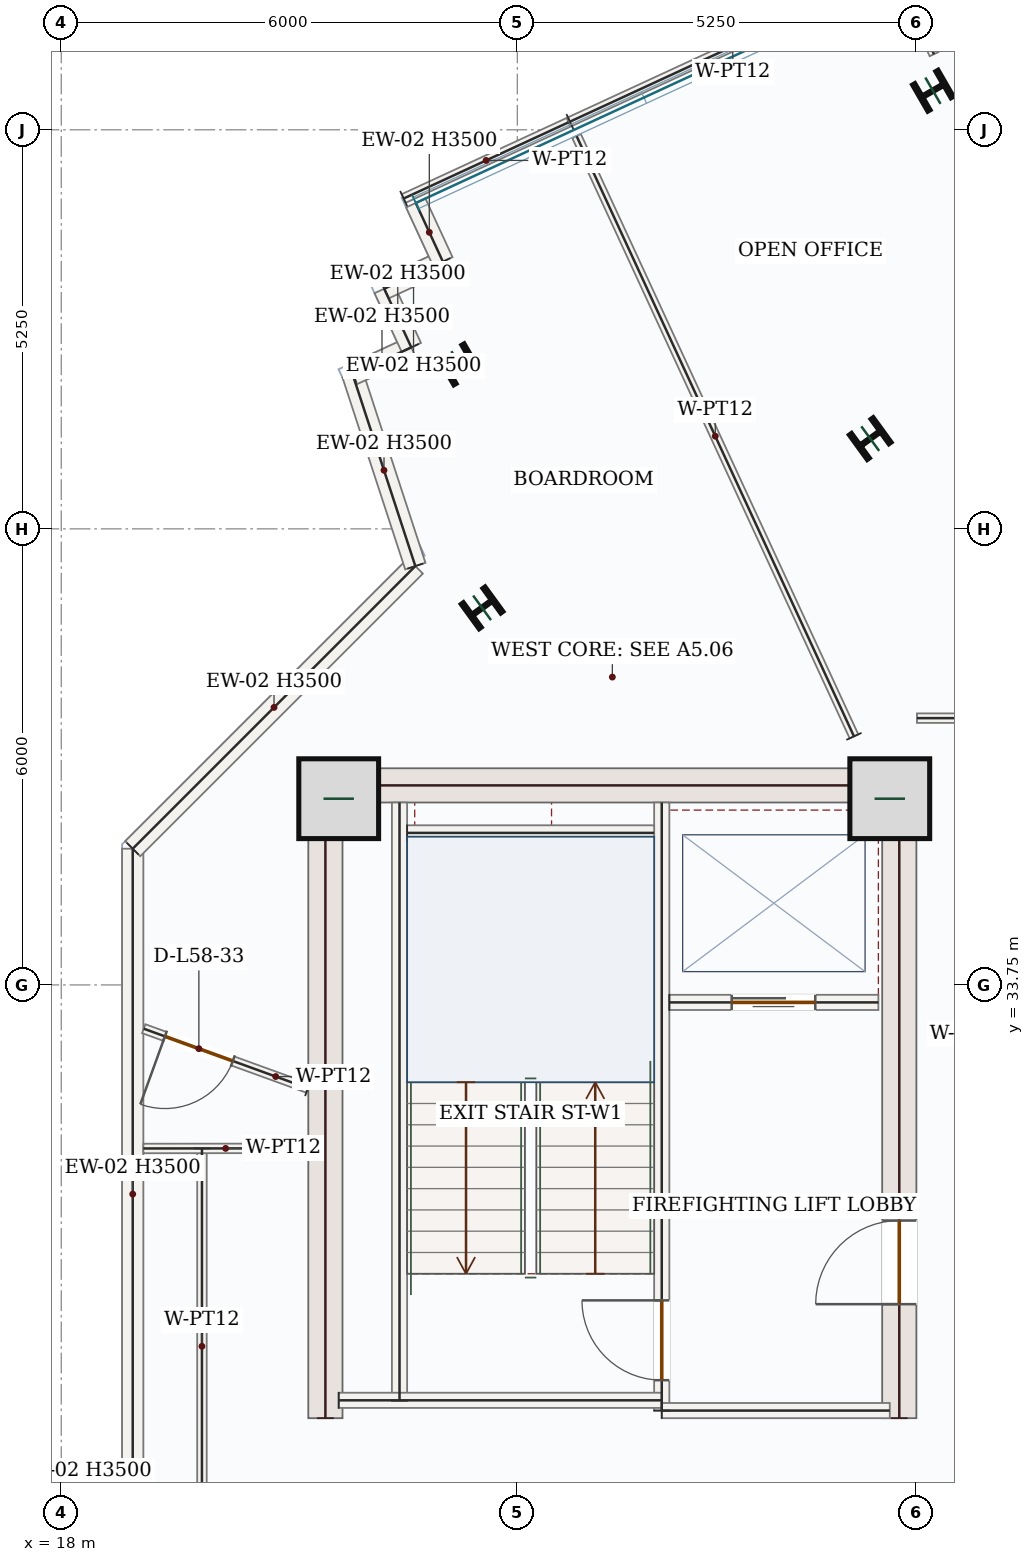
"""IFC4 building model, lengths in metres.
Left out: names, types, materials, properties, quantities, classifications, styles, units other than length and angle.
Written with IfcOpenShell. Run it as: python <this file> out.ifc"""

import sys

from ifc_helpers import new_model, si_unit, direction, frame, frame_2d, origin, origin_2d, place, context, subcontext, project, spatial, rectangle, i_section, extrude, source, transform, mapped, element, fill, save


model = new_model("IFC4")
c1 = context("Model", 3, precision=1e-05, world=origin(), true_north=direction((0.0, 1.0)))
c2 = subcontext(c1, "Body", "Model", "MODEL_VIEW")
j1 = project(units=[si_unit("LENGTHUNIT", "METRE"), si_unit("PLANEANGLEUNIT", "RADIAN")], contexts=[c1])
p1 = place(None, origin())
s1 = spatial("IfcSite", under=j1, at=p1, CompositionType="ELEMENT")
p2 = place(p1, origin())
s2 = spatial("IfcBuilding", under=s1, at=p2, CompositionType="ELEMENT")
p3 = place(p2, frame((0.0, 0.0, 246.6)))
s3 = spatial("IfcBuildingStorey", under=s2, at=p3, CompositionType="ELEMENT", Elevation=246.6)
m1 = source(origin(), c2, "Body", "SweptSolid", [
    extrude(rectangle(XDim=8.55, YDim=0.45, at=frame_2d((4.275, 0.0))), origin(), (0.0, 0.0, 1.0), 3.5),
])
p4 = place(p3, frame((21.475, 28.05, 0.0), z_axis=(0.0, 0.0, 1.0), x_axis=(0.0, 1.0, 0.0)))
e1 = element("IfcWall", 1, at=p4, inside=s3, PredefinedType="SHEAR", context=c2, shape_type="MappedRepresentation", body=[
    mapped(m1, transform((0.0, 0.0, 0.0), x_axis=(1.0, 0.0, 0.0), y_axis=(0.0, 1.0, 0.0), z_axis=(0.0, 0.0, 1.0), scale=1.0)),
])
p5 = place(p3, frame((29.025, 28.05, 0.0), z_axis=(0.0, 0.0, 1.0), x_axis=(0.0, 1.0, 0.0)))
e2 = element("IfcWall", 2, at=p5, inside=s3, PredefinedType="SHEAR", context=c2, shape_type="SweptSolid", body=[
    extrude(rectangle(XDim=8.55, YDim=0.45, at=frame_2d((4.275, 0.0))), origin(), (0.0, 0.0, 1.0), 3.5),
])
p6 = place(p5, frame((1.5, 0.0, 0.0)))
e3 = element("IfcOpeningElement", 3, at=p6, cuts=e2, PredefinedType="OPENING", context=c2, shape_type="SweptSolid", body=[
    extrude(rectangle(XDim=1.1, YDim=2.2, at=frame_2d((0.55, 1.1))), frame((0.0, 0.235, 0.0), z_axis=(0.0, -1.0, 0.0), x_axis=(1.0, 0.0, 0.0)), (0.0, 0.0, 1.0), 0.47),
])
m2 = source(origin(), c2, "Body", "SweptSolid", [
    extrude(rectangle(XDim=7.1, YDim=0.45, at=frame_2d((3.55, 0.0))), origin(), (0.0, 0.0, 1.0), 3.5),
])
p7 = place(p3, frame((21.7, 36.375, 0.0), z_axis=(0.0, 0.0, 1.0), x_axis=(1.0, 0.0, 0.0)))
e4 = element("IfcWall", 4, at=p7, inside=s3, PredefinedType="SHEAR", context=c2, shape_type="MappedRepresentation", body=[
    mapped(m2, transform((0.0, 0.0, 0.0), x_axis=(1.0, 0.0, 0.0), y_axis=(0.0, 1.0, 0.0), z_axis=(0.0, 0.0, 1.0), scale=1.0)),
])
m3 = source(origin(), c2, "Body", "SweptSolid", [
    extrude(rectangle(XDim=1.05, YDim=1.05, at=origin_2d()), origin(), (0.0, 0.0, 1.0), 3.75),
])
for number, where, z_axis, x_axis in (
    (5, (21.65, 36.2, 0.0), (0.0, 0.0, 1.0), (1.0, 0.0, 0.0)),
    (6, (28.9, 36.2, 0.0), (0.0, 0.0, 1.0), (1.0, 0.0, 0.0)),
):
    element("IfcColumn", number, at=place(p3, frame(where, z_axis=z_axis, x_axis=x_axis)), inside=s3, PredefinedType="COLUMN", context=c2, shape_type="MappedRepresentation", body=[
        mapped(m3, transform((0.0, 0.0, 0.0), x_axis=(1.0, 0.0, 0.0), y_axis=(0.0, 1.0, 0.0), z_axis=(0.0, 0.0, 1.0), scale=1.0)),
    ])
m4 = source(origin(), c2, "Body", "SweptSolid", [
    extrude(i_section(OverallWidth=0.399, OverallDepth=0.386, WebThickness=0.021, FlangeThickness=0.033, FilletRadius=0.018, at=origin_2d()), origin(), (0.0, 0.0, 1.0), 3.75),
])
for number, where, z_axis, x_axis in (
    (7, (28.643, 40.937, 0.0), (0.0, 0.0, 1.0), (-0.588, 0.809, 0.0)),
    (8, (23.536, 38.711, 0.0), (0.0, 0.0, 1.0), (-0.588, 0.809, 0.0)),
    (9, (29.468, 45.514, 0.0), (0.0, 0.0, 1.0), (-0.5, 0.866, 0.0)),
    (10, (23.232, 41.914, 0.0), (0.0, 0.0, 1.0), (-0.5, 0.866, 0.0)),
):
    element("IfcColumn", number, at=place(p3, frame(where, z_axis=z_axis, x_axis=x_axis)), inside=s3, PredefinedType="COLUMN", context=c2, shape_type="MappedRepresentation", body=[
        mapped(m4, transform((0.0, 0.0, 0.0), x_axis=(1.0, 0.0, 0.0), y_axis=(0.0, 1.0, 0.0), z_axis=(0.0, 0.0, 1.0), scale=1.0)),
    ])
m5 = source(origin(), c2, "Body", "SweptSolid", [
    extrude(rectangle(XDim=9.088, YDim=0.28, at=frame_2d((4.544, 0.0))), origin(), (0.0, 0.0, 1.0), 3.5),
])
p8 = place(p3, frame((18.94, 26.454, 0.0), z_axis=(0.0, 0.0, 1.0), x_axis=(0.0, 1.0, 0.0)))
e11 = element("IfcWall", 11, at=p8, inside=s3, PredefinedType="SOLIDWALL", context=c2, shape_type="MappedRepresentation", body=[
    mapped(m5, transform((0.0, 0.0, 0.0), x_axis=(1.0, 0.0, 0.0), y_axis=(0.0, 1.0, 0.0), z_axis=(0.0, 0.0, 1.0), scale=1.0)),
])
m6 = source(origin(), c2, "Body", "SweptSolid", [
    extrude(rectangle(XDim=5.258, YDim=0.28, at=frame_2d((2.629, 0.0))), origin(), (0.0, 0.0, 1.0), 3.5),
])
p9 = place(p3, frame((18.94, 35.542, 0.0), z_axis=(0.0, 0.0, 1.0), x_axis=(0.707106781187, 0.707106781187, 0.0)))
e12 = element("IfcWall", 12, at=p9, inside=s3, PredefinedType="SOLIDWALL", context=c2, shape_type="MappedRepresentation", body=[
    mapped(m6, transform((0.0, 0.0, 0.0), x_axis=(1.0, 0.0, 0.0), y_axis=(0.0, 1.0, 0.0), z_axis=(0.0, 0.0, 1.0), scale=1.0)),
])
m7 = source(origin(), c2, "Body", "SweptSolid", [
    extrude(rectangle(XDim=2.652, YDim=0.28, at=frame_2d((1.326, 0.0))), origin(), (0.0, 0.0, 1.0), 3.5),
])
p10 = place(p3, frame((22.658, 39.26, 0.0), z_axis=(0.0, 0.0, 1.0), x_axis=(-0.310838004308, 0.950462905682, 0.0)))
e13 = element("IfcWall", 13, at=p10, inside=s3, PredefinedType="SOLIDWALL", context=c2, shape_type="MappedRepresentation", body=[
    mapped(m7, transform((0.0, 0.0, 0.0), x_axis=(1.0, 0.0, 0.0), y_axis=(0.0, 1.0, 0.0), z_axis=(0.0, 0.0, 1.0), scale=1.0)),
])
m8 = source(origin(), c2, "Body", "SweptSolid", [
    extrude(rectangle(XDim=0.85, YDim=0.28, at=frame_2d((0.425, 0.0))), origin(), (0.0, 0.0, 1.0), 3.5),
])
for number, where, z_axis, x_axis in (
    (14, (21.833, 41.781, 0.0), (0.0, 0.0, 1.0), (0.908, 0.419, 0.0)),
    (15, (22.605, 42.137, 0.0), (0.0, 0.0, 1.0), (-0.419, 0.908, 0.0)),
):
    element("IfcWall", number, at=place(p3, frame(where, z_axis=z_axis, x_axis=x_axis)), inside=s3, PredefinedType="SOLIDWALL", context=c2, shape_type="MappedRepresentation", body=[
        mapped(m8, transform((0.0, 0.0, 0.0), x_axis=(1.0, 0.0, 0.0), y_axis=(0.0, 1.0, 0.0), z_axis=(0.0, 0.0, 1.0), scale=1.0)),
    ])
m9 = source(origin(), c2, "Body", "SweptSolid", [
    extrude(rectangle(XDim=0.85, YDim=0.28, at=frame_2d((0.425, 0.0))), origin(), (0.0, 0.0, 1.0), 3.5),
])
p11 = place(p3, frame((22.249, 42.909, 0.0), z_axis=(0.0, 0.0, 1.0), x_axis=(0.907791150023, 0.419422493365, 0.0)))
e16 = element("IfcWall", 16, at=p11, inside=s3, PredefinedType="SOLIDWALL", context=c2, shape_type="MappedRepresentation", body=[
    mapped(m9, transform((0.0, 0.0, 0.0), x_axis=(1.0, 0.0, 0.0), y_axis=(0.0, 1.0, 0.0), z_axis=(0.0, 0.0, 1.0), scale=1.0)),
])
p12 = place(p3, frame((23.02, 43.266, 0.0), z_axis=(0.0, 0.0, 1.0), x_axis=(-0.419313139191, 0.907841666427, 0.0)))
e17 = element("IfcWall", 17, at=p12, inside=s3, PredefinedType="SOLIDWALL", context=c2, shape_type="MappedRepresentation", body=[
    mapped(m8, transform((0.0, 0.0, 0.0), x_axis=(1.0, 0.0, 0.0), y_axis=(0.0, 1.0, 0.0), z_axis=(0.0, 0.0, 1.0), scale=1.0)),
])
m10 = source(origin(), c2, "Body", "SweptSolid", [
    extrude(rectangle(XDim=7.87, YDim=0.2, at=frame_2d((3.935, 0.0))), origin(), (0.0, 0.0, 1.0), 3.5),
])
p13 = place(p3, frame((22.45, 28.28, 0.0), z_axis=(0.0, 0.0, 1.0), x_axis=(0.0, 1.0, 0.0)))
e18 = element("IfcWall", 18, at=p13, inside=s3, PredefinedType="SOLIDWALL", context=c2, shape_type="MappedRepresentation", body=[
    mapped(m10, transform((0.0, 0.0, 0.0), x_axis=(1.0, 0.0, 0.0), y_axis=(0.0, 1.0, 0.0), z_axis=(0.0, 0.0, 1.0), scale=1.0)),
])
p14 = place(p3, frame((25.9, 28.15, 0.0), z_axis=(0.0, 0.0, 1.0), x_axis=(0.0, 1.0, 0.0)))
e19 = element("IfcWall", 19, at=p14, inside=s3, PredefinedType="SOLIDWALL", context=c2, shape_type="SweptSolid", body=[
    extrude(rectangle(XDim=8.0, YDim=0.2, at=frame_2d((4.0, 0.0))), origin(), (0.0, 0.0, 1.0), 3.5),
])
p15 = place(p14, frame((0.4, 0.0, 0.0)))
e20 = element("IfcOpeningElement", 20, at=p15, cuts=e19, PredefinedType="OPENING", context=c2, shape_type="SweptSolid", body=[
    extrude(rectangle(XDim=1.05, YDim=2.15, at=frame_2d((0.525, 1.075))), frame((0.0, 0.11, 0.0), z_axis=(0.0, -1.0, 0.0), x_axis=(1.0, 0.0, 0.0)), (0.0, 0.0, 1.0), 0.22),
])
m11 = source(origin(), c2, "Body", "SweptSolid", [
    extrude(rectangle(XDim=4.25, YDim=0.2, at=frame_2d((2.125, 0.0))), origin(), (0.0, 0.0, 1.0), 3.5),
])
p16 = place(p3, frame((21.65, 28.285, 0.0), z_axis=(0.0, 0.0, 1.0), x_axis=(1.0, 0.0, 0.0)))
e21 = element("IfcWall", 21, at=p16, inside=s3, PredefinedType="SOLIDWALL", context=c2, shape_type="MappedRepresentation", body=[
    mapped(m11, transform((0.0, 0.0, 0.0), x_axis=(1.0, 0.0, 0.0), y_axis=(0.0, 1.0, 0.0), z_axis=(0.0, 0.0, 1.0), scale=1.0)),
])
m12 = source(origin(), c2, "Body", "SweptSolid", [
    extrude(rectangle(XDim=3.0, YDim=0.2, at=frame_2d((1.5, 0.0))), origin(), (0.0, 0.0, 1.0), 3.5),
])
p17 = place(p3, frame((25.9, 28.15, 0.0), z_axis=(0.0, 0.0, 1.0), x_axis=(1.0, 0.0, 0.0)))
e22 = element("IfcWall", 22, at=p17, inside=s3, PredefinedType="SOLIDWALL", context=c2, shape_type="MappedRepresentation", body=[
    mapped(m12, transform((0.0, 0.0, 0.0), x_axis=(1.0, 0.0, 0.0), y_axis=(0.0, 1.0, 0.0), z_axis=(0.0, 0.0, 1.0), scale=1.0)),
])
m13 = source(origin(), c2, "Body", "SweptSolid", [
    extrude(rectangle(XDim=3.25, YDim=0.2, at=frame_2d((1.625, 0.0))), origin(), (0.0, 0.0, 1.0), 3.5),
])
p18 = place(p3, frame((22.55, 35.75, 0.0), z_axis=(0.0, 0.0, 1.0), x_axis=(1.0, 0.0, 0.0)))
e23 = element("IfcWall", 23, at=p18, inside=s3, PredefinedType="SOLIDWALL", context=c2, shape_type="MappedRepresentation", body=[
    mapped(m13, transform((0.0, 0.0, 0.0), x_axis=(1.0, 0.0, 0.0), y_axis=(0.0, 1.0, 0.0), z_axis=(0.0, 0.0, 1.0), scale=1.0)),
])
p19 = place(p3, frame((26.0, 33.52, 0.0), z_axis=(0.0, 0.0, 1.0), x_axis=(1.0, 0.0, 0.0)))
e24 = element("IfcWall", 24, at=p19, inside=s3, PredefinedType="SOLIDWALL", context=c2, shape_type="SweptSolid", body=[
    extrude(rectangle(XDim=2.75, YDim=0.2, at=frame_2d((1.375, 0.0))), origin(), (0.0, 0.0, 1.0), 3.5),
])
p20 = place(p19, frame((0.82, 0.0, 0.0)))
e25 = element("IfcOpeningElement", 25, at=p20, cuts=e24, PredefinedType="OPENING", context=c2, shape_type="SweptSolid", body=[
    extrude(rectangle(XDim=1.1, YDim=2.15, at=frame_2d((0.55, 1.075))), frame((0.0, 0.11, 0.0), z_axis=(0.0, -1.0, 0.0), x_axis=(1.0, 0.0, 0.0)), (0.0, 0.0, 1.0), 0.22),
])
p21 = place(p3, frame((33.443, 37.26, 0.0), z_axis=(0.0, 0.0, 1.0), x_axis=(-0.999999998299, -5.8329445e-05, 0.0)))
e26 = element("IfcWall", 26, at=p21, inside=s3, PredefinedType="PARTITIONING", context=c2, shape_type="SweptSolid", body=[
    extrude(rectangle(XDim=4.186, YDim=0.125, at=frame_2d((2.093, 0.0))), origin(), (0.0, 0.0, 1.0), 3.5),
])
p22 = place(p21, frame((0.712, 0.0, 0.0)))
e27 = element("IfcOpeningElement", 27, at=p22, cuts=e26, PredefinedType="OPENING", context=c2, shape_type="SweptSolid", body=[
    extrude(rectangle(XDim=0.95, YDim=2.15, at=frame_2d((0.475, 1.075))), frame((0.0, 0.073, 0.0), z_axis=(0.0, -1.0, 0.0), x_axis=(1.0, 0.0, 0.0)), (0.0, 0.0, 1.0), 0.145),
])
m14 = source(origin(), c2, "Body", "SweptSolid", [
    extrude(rectangle(XDim=8.701, YDim=0.125, at=frame_2d((4.351, 0.0))), origin(), (0.0, 0.0, 1.0), 3.5),
])
p23 = place(p3, frame((28.429, 37.02, 0.0), z_axis=(0.0, 0.0, 1.0), x_axis=(-0.419458495046, 0.907774515468, 0.0)))
e28 = element("IfcWall", 28, at=p23, inside=s3, PredefinedType="PARTITIONING", context=c2, shape_type="MappedRepresentation", body=[
    mapped(m14, transform((0.0, 0.0, 0.0), x_axis=(1.0, 0.0, 0.0), y_axis=(0.0, 1.0, 0.0), z_axis=(0.0, 0.0, 1.0), scale=1.0)),
])
m15 = source(origin(), c2, "Body", "SweptSolid", [
    extrude(rectangle(XDim=4.72, YDim=0.125, at=frame_2d((2.36, 0.0))), origin(), (0.0, 0.0, 1.0), 3.5),
])
p24 = place(p3, frame((24.692, 45.107, 0.0), z_axis=(0.0, 0.0, 1.0), x_axis=(0.907753377062, 0.419504238873, 0.0)))
e29 = element("IfcWall", 29, at=p24, inside=s3, PredefinedType="PARTITIONING", context=c2, shape_type="MappedRepresentation", body=[
    mapped(m15, transform((0.0, 0.0, 0.0), x_axis=(1.0, 0.0, 0.0), y_axis=(0.0, 1.0, 0.0), z_axis=(0.0, 0.0, 1.0), scale=1.0)),
])
m16 = source(origin(), c2, "Body", "SweptSolid", [
    extrude(rectangle(XDim=0.996, YDim=0.125, at=frame_2d((0.498, 0.0))), origin(), (0.0, 0.0, 1.0), 3.5),
])
p25 = place(p3, frame((29.064, 46.898, 0.0), z_axis=(0.0, 0.0, 1.0), x_axis=(0.419540149112, -0.907736780836, 0.0)))
e30 = element("IfcWall", 30, at=p25, inside=s3, PredefinedType="PARTITIONING", context=c2, shape_type="MappedRepresentation", body=[
    mapped(m16, transform((0.0, 0.0, 0.0), x_axis=(1.0, 0.0, 0.0), y_axis=(0.0, 1.0, 0.0), z_axis=(0.0, 0.0, 1.0), scale=1.0)),
])
p26 = place(p3, frame((21.245, 32.391, 0.0), z_axis=(0.0, 0.0, 1.0), x_axis=(-0.940115637779, 0.340855669755, 0.0)))
e31 = element("IfcWall", 31, at=p26, inside=s3, PredefinedType="PARTITIONING", context=c2, shape_type="SweptSolid", body=[
    extrude(rectangle(XDim=2.298, YDim=0.125, at=frame_2d((1.149, 0.0))), origin(), (0.0, 0.0, 1.0), 3.5),
])
p27 = place(p26, frame((1.051, 0.0, 0.0)))
e32 = element("IfcOpeningElement", 32, at=p27, cuts=e31, PredefinedType="OPENING", context=c2, shape_type="SweptSolid", body=[
    extrude(rectangle(XDim=0.95, YDim=2.15, at=frame_2d((0.475, 1.075))), frame((0.0, 0.073, 0.0), z_axis=(0.0, -1.0, 0.0), x_axis=(1.0, 0.0, 0.0)), (0.0, 0.0, 1.0), 0.145),
])
m17 = source(origin(), c2, "Body", "SweptSolid", [
    extrude(rectangle(XDim=2.39, YDim=0.125, at=frame_2d((1.195, 0.0))), origin(), (0.0, 0.0, 1.0), 3.5),
])
p28 = place(p3, frame((22.505, 44.096, 0.0), z_axis=(0.0, 0.0, 1.0), x_axis=(0.907773916688, 0.419459790898, 0.0)))
e33 = element("IfcWall", 33, at=p28, inside=s3, PredefinedType="PARTITIONING", context=c2, shape_type="MappedRepresentation", body=[
    mapped(m17, transform((0.0, 0.0, 0.0), x_axis=(1.0, 0.0, 0.0), y_axis=(0.0, 1.0, 0.0), z_axis=(0.0, 0.0, 1.0), scale=1.0)),
])
p29 = place(p3, frame((19.851, 31.599, 0.0), z_axis=(0.0, 0.0, 1.0), x_axis=(-7.9685508e-05, -0.999999996825, 0.0)))
e34 = element("IfcWall", 34, at=p29, inside=s3, PredefinedType="PARTITIONING", context=c2, shape_type="SweptSolid", body=[
    extrude(rectangle(XDim=9.191, YDim=0.125, at=frame_2d((4.596, 0.0))), origin(), (0.0, 0.0, 1.0), 3.5),
])
p30 = place(p29, frame((5.357, 0.0, 0.0)))
e35 = element("IfcOpeningElement", 35, at=p30, cuts=e34, PredefinedType="OPENING", context=c2, shape_type="SweptSolid", body=[
    extrude(rectangle(XDim=0.95, YDim=2.15, at=frame_2d((0.475, 1.075))), frame((0.0, 0.073, 0.0), z_axis=(0.0, -1.0, 0.0), x_axis=(1.0, 0.0, 0.0)), (0.0, 0.0, 1.0), 0.145),
])
m18 = source(origin(), c2, "Body", "SweptSolid", [
    extrude(rectangle(XDim=2.165, YDim=0.125, at=frame_2d((1.083, 0.0))), origin(), (0.0, 0.0, 1.0), 3.5),
])
p31 = place(p3, frame((21.245, 31.6, 0.0), z_axis=(0.0, 0.0, 1.0), x_axis=(-0.999999688459, -0.000789354738, 0.0)))
e36 = element("IfcWall", 36, at=p31, inside=s3, PredefinedType="PARTITIONING", context=c2, shape_type="MappedRepresentation", body=[
    mapped(m18, transform((0.0, 0.0, 0.0), x_axis=(1.0, 0.0, 0.0), y_axis=(0.0, 1.0, 0.0), z_axis=(0.0, 0.0, 1.0), scale=1.0)),
])
m19 = source(origin(), c2, "Body", "SweptSolid", [
    extrude(rectangle(XDim=1.05, YDim=2.15, at=frame_2d((0.525, 1.075))), frame((0.0, 0.025, 0.0), z_axis=(0.0, -1.0, 0.0), x_axis=(1.0, 0.0, 0.0)), (0.0, 0.0, 1.0), 0.05),
])
p32 = place(p15, origin())
e37 = element("IfcDoor", 37, at=p32, inside=s3, OperationType="SINGLE_SWING_RIGHT", PredefinedType="DOOR", context=c2, shape_type="MappedRepresentation", body=[
    mapped(m19, transform((0.0, 0.0, 0.0), x_axis=(1.0, 0.0, 0.0), y_axis=(0.0, 1.0, 0.0), z_axis=(0.0, 0.0, 1.0), scale=1.0)),
])
fill(e20, e37)
m20 = source(origin(), c2, "Body", "SweptSolid", [
    extrude(rectangle(XDim=1.1, YDim=2.15, at=frame_2d((0.55, 1.075))), frame((0.0, 0.025, 0.0), z_axis=(0.0, -1.0, 0.0), x_axis=(1.0, 0.0, 0.0)), (0.0, 0.0, 1.0), 0.05),
])
p33 = place(p20, origin())
e38 = element("IfcDoor", 38, at=p33, inside=s3, OperationType="DOUBLE_DOOR_SLIDING", PredefinedType="DOOR", context=c2, shape_type="MappedRepresentation", body=[
    mapped(m20, transform((0.0, 0.0, 0.0), x_axis=(1.0, 0.0, 0.0), y_axis=(0.0, 1.0, 0.0), z_axis=(0.0, 0.0, 1.0), scale=1.0)),
])
fill(e25, e38)
m21 = source(origin(), c2, "Body", "SweptSolid", [
    extrude(rectangle(XDim=1.1, YDim=2.2, at=frame_2d((0.55, 1.1))), frame((0.0, 0.025, 0.0), z_axis=(0.0, -1.0, 0.0), x_axis=(1.0, 0.0, 0.0)), (0.0, 0.0, 1.0), 0.05),
])
p34 = place(p6, origin())
e39 = element("IfcDoor", 39, at=p34, inside=s3, OperationType="SINGLE_SWING_LEFT", PredefinedType="DOOR", context=c2, shape_type="MappedRepresentation", body=[
    mapped(m21, transform((0.0, 0.0, 0.0), x_axis=(1.0, 0.0, 0.0), y_axis=(0.0, 1.0, 0.0), z_axis=(0.0, 0.0, 1.0), scale=1.0)),
])
fill(e3, e39)
m22 = source(origin(), c2, "Body", "SweptSolid", [
    extrude(rectangle(XDim=0.95, YDim=2.15, at=frame_2d((0.475, 1.075))), frame((0.0, 0.025, 0.0), z_axis=(0.0, -1.0, 0.0), x_axis=(1.0, 0.0, 0.0)), (0.0, 0.0, 1.0), 0.05),
])
p35 = place(p27, origin())
e40 = element("IfcDoor", 40, at=p35, inside=s3, OperationType="SINGLE_SWING_RIGHT", PredefinedType="DOOR", context=c2, shape_type="MappedRepresentation", body=[
    mapped(m22, transform((0.0, 0.0, 0.0), x_axis=(1.0, 0.0, 0.0), y_axis=(0.0, 1.0, 0.0), z_axis=(0.0, 0.0, 1.0), scale=1.0)),
])
fill(e32, e40)
save(model, sys.argv[1])
